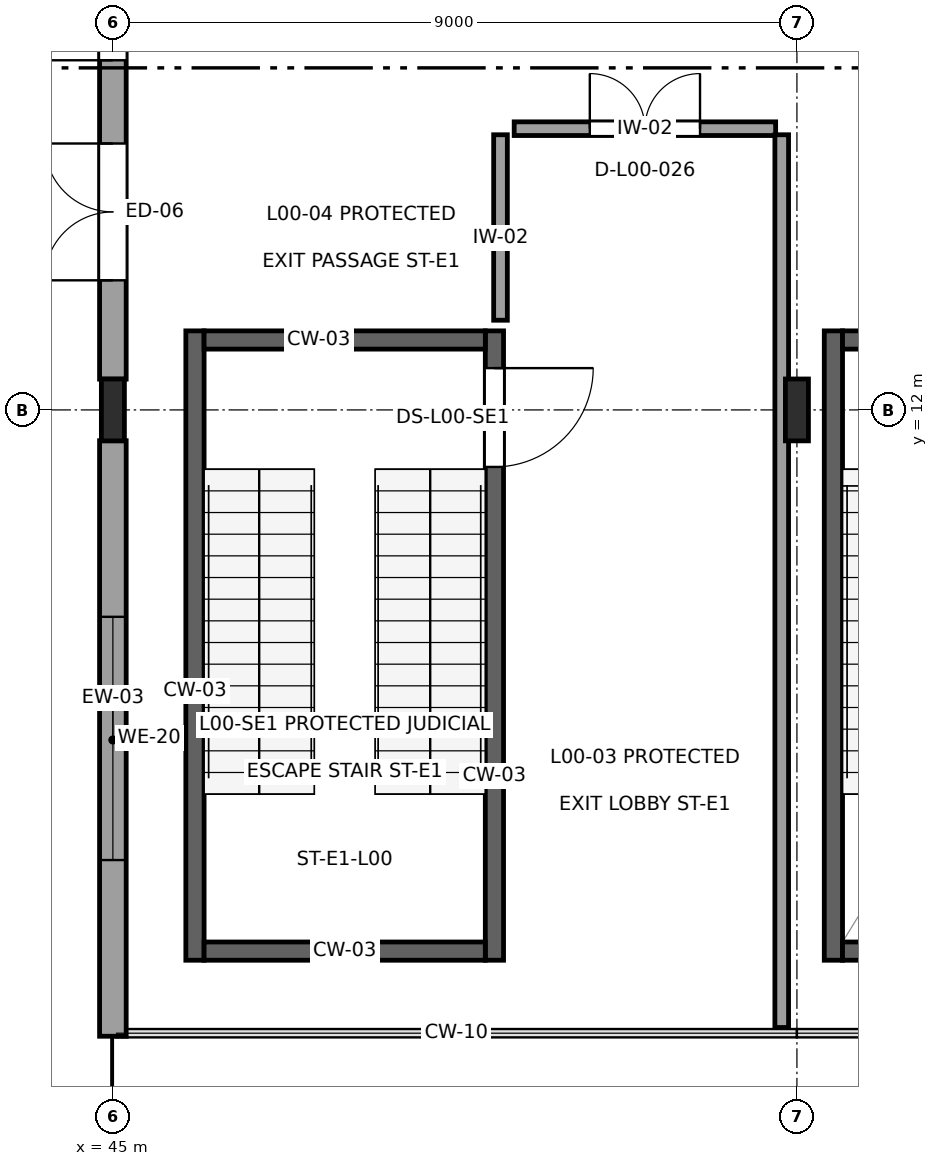
"""IFC4 building model, lengths in metres.
Left out: names, types, materials, properties, quantities, classifications, styles, units other than length and angle.
Written with IfcOpenShell. Run it as: python <this file> out.ifc"""

import sys

from ifc_helpers import new_model, si_unit, direction, frame, frame_2d, origin, origin_2d, place, context, subcontext, project, spatial, rectangle, i_section, extrude, element, fill, save


model = new_model("IFC4")
c1 = context("Model", 3, precision=1e-05, world=origin(), true_north=direction((0.0, 1.0)))
c2 = subcontext(c1, "Body", "Model", "MODEL_VIEW")
j1 = project(units=[si_unit("LENGTHUNIT", "METRE"), si_unit("PLANEANGLEUNIT", "RADIAN")], contexts=[c1])
p1 = place(None, origin())
s1 = spatial("IfcSite", under=j1, at=p1, CompositionType="ELEMENT")
p2 = place(p1, origin())
s2 = spatial("IfcBuilding", under=s1, at=p2, CompositionType="ELEMENT")
p3 = place(p2, origin())
s3 = spatial("IfcBuildingStorey", under=s2, at=p3, CompositionType="ELEMENT", Elevation=0.0)
for number, where, z_axis, x_axis in (
    (1, (45.0, 12.0, 0.0), (0.0, 0.0, 1.0), (1.0, 0.0, 0.0)),
    (2, (54.0, 12.0, 0.0), (0.0, 0.0, 1.0), (1.0, 0.0, 0.0)),
):
    element("IfcColumn", number, at=place(p3, frame(where, z_axis=z_axis, x_axis=x_axis)), inside=s3, PredefinedType="COLUMN", context=c2, shape_type="SweptSolid", body=[
        extrude(i_section(OverallWidth=0.303, OverallDepth=0.814, WebThickness=0.021, FlangeThickness=0.04, at=origin_2d()), origin(), (0.0, 0.0, 1.0), 5.4),
    ])
p4 = place(p3, frame((45.0, 23.595, 0.0), z_axis=(0.0, 0.0, 1.0), x_axis=(0.0, -1.0, 0.0)))
e3 = element("IfcWall", 3, at=p4, inside=s3, PredefinedType="SOLIDWALL", context=c2, shape_type="SweptSolid", body=[
    extrude(rectangle(XDim=11.19, YDim=0.35, at=frame_2d((5.595, 0.0))), origin(), (0.0, 0.0, 1.0), 4.725),
])
p5 = place(p4, frame((4.595, 0.0, 0.0)))
e4 = element("IfcOpeningElement", 4, at=p5, cuts=e3, PredefinedType="OPENING", context=c2, shape_type="SweptSolid", body=[
    extrude(rectangle(XDim=2.4, YDim=2.8, at=frame_2d((1.2, 1.4))), frame((0.0, 0.19, 0.0), z_axis=(0.0, -1.0, 0.0), x_axis=(1.0, 0.0, 0.0)), (0.0, 0.0, 1.0), 0.38),
])
p6 = place(p4, frame((8.09, 0.0, 0.0)))
e5 = element("IfcOpeningElement", 5, at=p6, cuts=e3, PredefinedType="OPENING", context=c2, shape_type="SweptSolid", body=[
    extrude(rectangle(XDim=1.8, YDim=2.4, at=frame_2d((0.9, 1.2))), frame((0.0, 0.19, 0.0), z_axis=(0.0, -1.0, 0.0), x_axis=(1.0, 0.0, 0.0)), (0.0, 0.0, 1.0), 0.38),
])
p7 = place(p3, frame((45.0, 11.595, 0.0), z_axis=(0.0, 0.0, 1.0), x_axis=(0.0, -1.0, 0.0)))
e6 = element("IfcWall", 6, at=p7, inside=s3, PredefinedType="SOLIDWALL", context=c2, shape_type="SweptSolid", body=[
    extrude(rectangle(XDim=7.835, YDim=0.35, at=frame_2d((3.917, 0.0))), origin(), (0.0, 0.0, 1.0), 4.725),
])
p8 = place(p7, frame((2.317, 0.0, 0.85)))
e7 = element("IfcOpeningElement", 7, at=p8, cuts=e6, PredefinedType="OPENING", context=c2, shape_type="SweptSolid", body=[
    extrude(rectangle(XDim=3.2, YDim=1.8, at=frame_2d((1.6, 0.9))), frame((0.0, 0.19, 0.0), z_axis=(0.0, -1.0, 0.0), x_axis=(1.0, 0.0, 0.0)), (0.0, 0.0, 1.0), 0.38),
])
p9 = place(p3, frame((54.48, 4.76, 0.0), z_axis=(0.0, 0.0, 1.0), x_axis=(0.0, 1.0, 0.0)))
e8 = element("IfcWall", 8, at=p9, inside=s3, PredefinedType="SHEAR", context=c2, shape_type="SweptSolid", body=[
    extrude(rectangle(XDim=8.28, YDim=0.24, at=frame_2d((4.14, 0.0))), origin(), (0.0, 0.0, 1.0), 5.21),
])
for number, where, z_axis, x_axis in (
    (9, (54.6, 4.88, 0.0), (0.0, 0.0, 1.0), (1.0, 0.0, 0.0)),
    (10, (54.6, 12.92, 0.0), (0.0, 0.0, 1.0), (1.0, 0.0, 0.0)),
):
    element("IfcWall", number, at=place(p3, frame(where, z_axis=z_axis, x_axis=x_axis)), inside=s3, PredefinedType="SHEAR", context=c2, shape_type="SweptSolid", body=[
        extrude(rectangle(XDim=3.7, YDim=0.24, at=frame_2d((1.85, 0.0))), origin(), (0.0, 0.0, 1.0), 5.21),
    ])
p10 = place(p3, frame((46.08, 4.76, 0.0), z_axis=(0.0, 0.0, 1.0), x_axis=(0.0, 1.0, 0.0)))
e11 = element("IfcWall", 11, at=p10, inside=s3, PredefinedType="SHEAR", context=c2, shape_type="SweptSolid", body=[
    extrude(rectangle(XDim=8.28, YDim=0.24, at=frame_2d((4.14, 0.0))), origin(), (0.0, 0.0, 1.0), 5.21),
])
p11 = place(p3, frame((50.02, 4.76, 0.0), z_axis=(0.0, 0.0, 1.0), x_axis=(0.0, 1.0, 0.0)))
e12 = element("IfcWall", 12, at=p11, inside=s3, PredefinedType="SHEAR", context=c2, shape_type="SweptSolid", body=[
    extrude(rectangle(XDim=8.28, YDim=0.24, at=frame_2d((4.14, 0.0))), origin(), (0.0, 0.0, 1.0), 5.21),
])
p12 = place(p11, frame((6.49, 0.0, 0.0)))
e13 = element("IfcOpeningElement", 13, at=p12, cuts=e12, PredefinedType="OPENING", context=c2, shape_type="SweptSolid", body=[
    extrude(rectangle(XDim=1.3, YDim=2.2, at=frame_2d((0.65, 1.1))), frame((0.0, 0.135, 0.0), z_axis=(0.0, -1.0, 0.0), x_axis=(1.0, 0.0, 0.0)), (0.0, 0.0, 1.0), 0.27),
])
for number, where, z_axis, x_axis in (
    (14, (46.2, 4.88, 0.0), (0.0, 0.0, 1.0), (1.0, 0.0, 0.0)),
    (15, (46.2, 12.92, 0.0), (0.0, 0.0, 1.0), (1.0, 0.0, 0.0)),
):
    element("IfcWall", number, at=place(p3, frame(where, z_axis=z_axis, x_axis=x_axis)), inside=s3, PredefinedType="SHEAR", context=c2, shape_type="SweptSolid", body=[
        extrude(rectangle(XDim=3.7, YDim=0.24, at=frame_2d((1.85, 0.0))), origin(), (0.0, 0.0, 1.0), 5.21),
    ])
p13 = place(p3, frame((50.28, 15.7, 0.0), z_axis=(0.0, 0.0, 1.0), x_axis=(1.0, 0.0, 0.0)))
e16 = element("IfcWall", 16, at=p13, inside=s3, PredefinedType="PARTITIONING", context=c2, shape_type="SweptSolid", body=[
    extrude(rectangle(XDim=3.44, YDim=0.18, at=frame_2d((1.72, 0.0))), origin(), (0.0, 0.0, 1.0), 5.04),
])
p14 = place(p13, frame((0.995, 0.0, 0.0)))
e17 = element("IfcOpeningElement", 17, at=p14, cuts=e16, PredefinedType="OPENING", context=c2, shape_type="SweptSolid", body=[
    extrude(rectangle(XDim=1.45, YDim=2.2, at=frame_2d((0.725, 1.1))), frame((0.0, 0.105, 0.0), z_axis=(0.0, -1.0, 0.0), x_axis=(1.0, 0.0, 0.0)), (0.0, 0.0, 1.0), 0.21),
])
p15 = place(p3, frame((53.8, 15.62, 0.0), z_axis=(0.0, 0.0, 1.0), x_axis=(0.0, -1.0, 0.0)))
e18 = element("IfcWall", 18, at=p15, inside=s3, PredefinedType="PARTITIONING", context=c2, shape_type="SweptSolid", body=[
    extrude(rectangle(XDim=11.745, YDim=0.18, at=frame_2d((5.873, 0.0))), origin(), (0.0, 0.0, 1.0), 4.685),
])
p16 = place(p3, frame((50.1, 15.62, 0.0), z_axis=(0.0, 0.0, 1.0), x_axis=(0.0, -1.0, 0.0)))
e19 = element("IfcWall", 19, at=p16, inside=s3, PredefinedType="PARTITIONING", context=c2, shape_type="SweptSolid", body=[
    extrude(rectangle(XDim=2.44, YDim=0.18, at=frame_2d((1.22, 0.0))), origin(), (0.0, 0.0, 1.0), 5.04),
])
p17 = place(p5, frame((2.4, 0.0, 0.0), z_axis=(0.0, 0.0, 1.0), x_axis=(-1.0, 0.0, 0.0)))
e20 = element("IfcDoor", 20, at=p17, inside=s3, OperationType="DOUBLE_DOOR_SINGLE_SWING", PredefinedType="DOOR", context=c2, shape_type="SweptSolid", body=[
    extrude(rectangle(XDim=2.4, YDim=2.8, at=frame_2d((1.2, 1.4))), frame((0.0, 0.025, 0.0), z_axis=(0.0, -1.0, 0.0), x_axis=(1.0, 0.0, 0.0)), (0.0, 0.0, 1.0), 0.05),
])
fill(e4, e20)
p18 = place(p6, frame((1.8, 0.0, 0.0), z_axis=(0.0, 0.0, 1.0), x_axis=(-1.0, 0.0, 0.0)))
e21 = element("IfcDoor", 21, at=p18, inside=s3, OperationType="DOUBLE_DOOR_SINGLE_SWING", PredefinedType="DOOR", context=c2, shape_type="SweptSolid", body=[
    extrude(rectangle(XDim=1.8, YDim=2.4, at=frame_2d((0.9, 1.2))), frame((0.0, 0.025, 0.0), z_axis=(0.0, -1.0, 0.0), x_axis=(1.0, 0.0, 0.0)), (0.0, 0.0, 1.0), 0.05),
])
fill(e5, e21)
p19 = place(p8, origin())
e22 = element("IfcWindow", 22, at=p19, inside=s3, PartitioningType="SINGLE_PANEL", PredefinedType="WINDOW", context=c2, shape_type="SweptSolid", body=[
    extrude(rectangle(XDim=3.2, YDim=1.8, at=frame_2d((1.6, 0.9))), frame((0.0, 0.03, 0.0), z_axis=(0.0, -1.0, 0.0), x_axis=(1.0, 0.0, 0.0)), (0.0, 0.0, 1.0), 0.06),
])
fill(e7, e22)
p20 = place(p12, frame((1.3, 0.0, 0.0), z_axis=(0.0, 0.0, 1.0), x_axis=(-1.0, 0.0, 0.0)))
e23 = element("IfcDoor", 23, at=p20, inside=s3, OperationType="SINGLE_SWING_RIGHT", PredefinedType="DOOR", context=c2, shape_type="SweptSolid", body=[
    extrude(rectangle(XDim=1.3, YDim=2.2, at=frame_2d((0.65, 1.1))), frame((0.0, 0.025, 0.0), z_axis=(0.0, -1.0, 0.0), x_axis=(1.0, 0.0, 0.0)), (0.0, 0.0, 1.0), 0.05),
])
fill(e13, e23)
p21 = place(p14, origin())
e24 = element("IfcDoor", 24, at=p21, inside=s3, OperationType="DOUBLE_DOOR_SINGLE_SWING", PredefinedType="DOOR", context=c2, shape_type="SweptSolid", body=[
    extrude(rectangle(XDim=1.45, YDim=2.2, at=frame_2d((0.725, 1.1))), frame((0.0, 0.025, 0.0), z_axis=(0.0, -1.0, 0.0), x_axis=(1.0, 0.0, 0.0)), (0.0, 0.0, 1.0), 0.05),
])
fill(e17, e24)
save(model, sys.argv[1])
